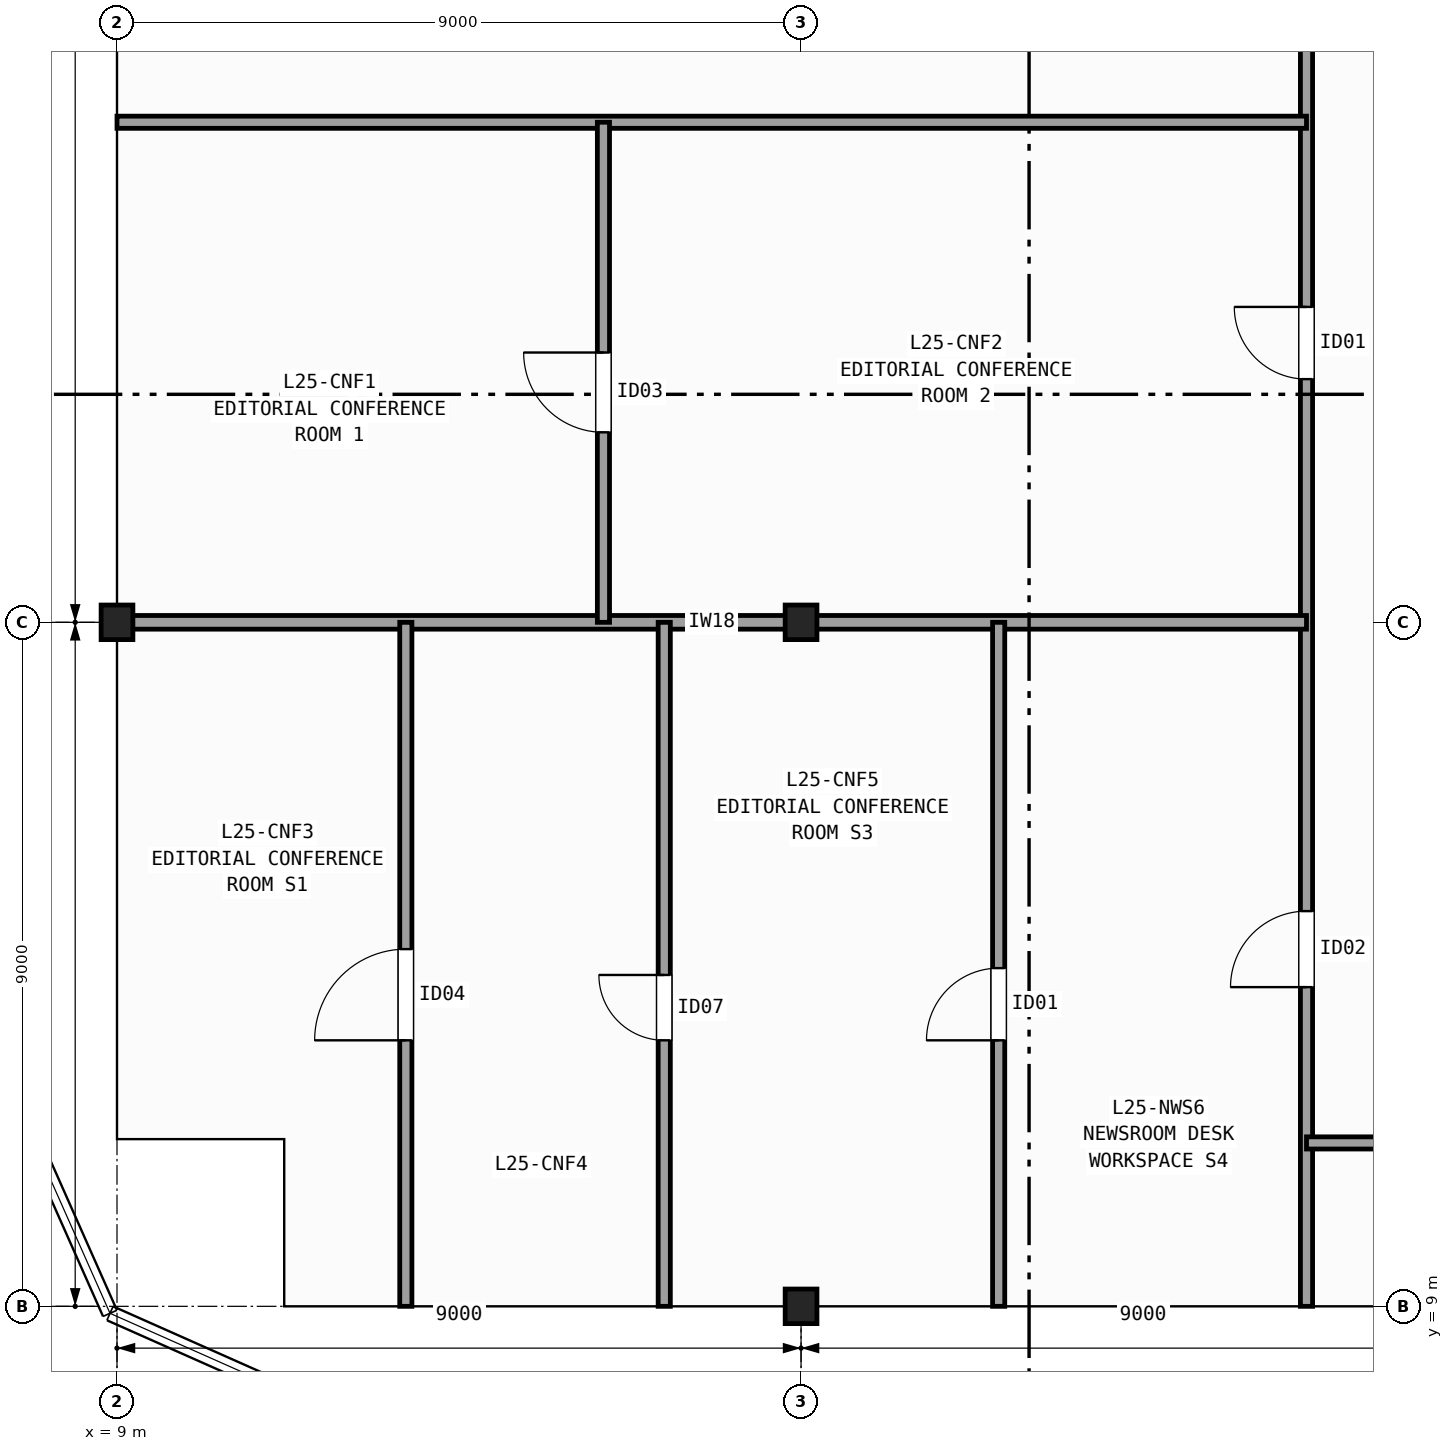
"""IFC4 building model, lengths in metres.
Left out: names, types, materials, properties, quantities, classifications, styles, units other than length and angle.
Written with IfcOpenShell. Run it as: python <this file> out.ifc"""

import sys

from ifc_helpers import new_model, si_unit, direction, frame, frame_2d, origin, origin_2d, place, context, subcontext, project, spatial, rectangle, i_section, extrude, element, fill, save


model = new_model("IFC4")
c1 = context("Model", 3, precision=1e-05, world=origin(), true_north=direction((0.0, 1.0)))
c2 = subcontext(c1, "Body", "Model", "MODEL_VIEW")
j1 = project(units=[si_unit("LENGTHUNIT", "METRE"), si_unit("PLANEANGLEUNIT", "RADIAN")], contexts=[c1])
p1 = place(None, origin())
s1 = spatial("IfcSite", under=j1, at=p1, CompositionType="ELEMENT")
p2 = place(p1, origin())
s2 = spatial("IfcBuilding", under=s1, at=p2, CompositionType="ELEMENT")
p3 = place(p2, frame((0.0, 0.0, 105.0)))
s3 = spatial("IfcBuildingStorey", under=s2, at=p3, CompositionType="ELEMENT", Elevation=105.0)
for number, where, z_axis, x_axis in (
    (1, (9.0, 18.0, 0.0), (0.0, 0.0, 1.0), (1.0, 0.0, 0.0)),
    (2, (18.0, 9.0, 0.0), (0.0, 0.0, 1.0), (1.0, 0.0, 0.0)),
    (3, (18.0, 18.0, 0.0), (0.0, 0.0, 1.0), (1.0, 0.0, 0.0)),
):
    element("IfcColumn", number, at=place(p3, frame(where, z_axis=z_axis, x_axis=x_axis)), inside=s3, PredefinedType="COLUMN", context=c2, shape_type="SweptSolid", body=[
        extrude(i_section(OverallWidth=0.418, OverallDepth=0.455, WebThickness=0.042, FlangeThickness=0.068, FilletRadius=0.015, at=origin_2d()), origin(), (0.0, 0.0, 1.0), 5.0),
    ])
p4 = place(p3, frame((24.65, 9.0, 0.0), z_axis=(0.0, 0.0, 1.0), x_axis=(0.0, 1.0, 0.0)))
e4 = element("IfcWall", 4, at=p4, inside=s3, PredefinedType="PARTITIONING", context=c2, shape_type="SweptSolid", body=[
    extrude(rectangle(XDim=19.2, YDim=0.16, at=frame_2d((9.6, 0.0))), origin(), (0.0, 0.0, 1.0), 3.934),
])
p5 = place(p4, frame((12.2, 0.0, 0.0)))
e5 = element("IfcOpeningElement", 5, at=p5, cuts=e4, PredefinedType="OPENING", context=c2, shape_type="SweptSolid", body=[
    extrude(rectangle(XDim=0.95, YDim=2.1, at=frame_2d((0.475, 1.05))), frame((0.0, 0.09, 0.0), z_axis=(0.0, -1.0, 0.0), x_axis=(1.0, 0.0, 0.0)), (0.0, 0.0, 1.0), 0.18),
])
p6 = place(p4, frame((4.2, 0.0, 0.0)))
e6 = element("IfcOpeningElement", 6, at=p6, cuts=e4, PredefinedType="OPENING", context=c2, shape_type="SweptSolid", body=[
    extrude(rectangle(XDim=1.0, YDim=2.1, at=frame_2d((0.5, 1.05))), frame((0.0, 0.09, 0.0), z_axis=(0.0, -1.0, 0.0), x_axis=(1.0, 0.0, 0.0)), (0.0, 0.0, 1.0), 0.18),
])
p7 = place(p3, frame((9.0, 24.58, 0.0), z_axis=(0.0, 0.0, 1.0), x_axis=(1.0, 0.0, 0.0)))
e7 = element("IfcWall", 7, at=p7, inside=s3, PredefinedType="PARTITIONING", context=c2, shape_type="SweptSolid", body=[
    extrude(rectangle(XDim=15.65, YDim=0.16, at=frame_2d((7.825, 0.0))), origin(), (0.0, 0.0, 1.0), 3.934),
])
p8 = place(p3, frame((9.0, 18.0, 0.0), z_axis=(0.0, 0.0, 1.0), x_axis=(1.0, 0.0, 0.0)))
e8 = element("IfcWall", 8, at=p8, inside=s3, PredefinedType="PARTITIONING", context=c2, shape_type="SweptSolid", body=[
    extrude(rectangle(XDim=15.65, YDim=0.18, at=frame_2d((7.825, 0.0))), origin(), (0.0, 0.0, 1.0), 3.934),
])
p9 = place(p3, frame((15.4, 18.0, 0.0), z_axis=(0.0, 0.0, 1.0), x_axis=(0.0, 1.0, 0.0)))
e9 = element("IfcWall", 9, at=p9, inside=s3, PredefinedType="PARTITIONING", context=c2, shape_type="SweptSolid", body=[
    extrude(rectangle(XDim=6.58, YDim=0.16, at=frame_2d((3.29, 0.0))), origin(), (0.0, 0.0, 1.0), 4.089),
])
p10 = place(p9, frame((2.5, 0.0, 0.0)))
e10 = element("IfcOpeningElement", 10, at=p10, cuts=e9, PredefinedType="OPENING", context=c2, shape_type="SweptSolid", body=[
    extrude(rectangle(XDim=1.05, YDim=2.15, at=frame_2d((0.525, 1.075))), frame((0.0, 0.09, 0.0), z_axis=(0.0, -1.0, 0.0), x_axis=(1.0, 0.0, 0.0)), (0.0, 0.0, 1.0), 0.18),
])
p11 = place(p3, frame((12.8, 9.0, 0.0), z_axis=(0.0, 0.0, 1.0), x_axis=(0.0, 1.0, 0.0)))
e11 = element("IfcWall", 11, at=p11, inside=s3, PredefinedType="PARTITIONING", context=c2, shape_type="SweptSolid", body=[
    extrude(rectangle(XDim=9.0, YDim=0.16, at=frame_2d((4.5, 0.0))), origin(), (0.0, 0.0, 1.0), 4.089),
])
p12 = place(p11, frame((3.5, 0.0, 0.0)))
e12 = element("IfcOpeningElement", 12, at=p12, cuts=e11, PredefinedType="OPENING", context=c2, shape_type="SweptSolid", body=[
    extrude(rectangle(XDim=1.2, YDim=2.15, at=frame_2d((0.6, 1.075))), frame((0.0, 0.09, 0.0), z_axis=(0.0, -1.0, 0.0), x_axis=(1.0, 0.0, 0.0)), (0.0, 0.0, 1.0), 0.18),
])
p13 = place(p3, frame((16.2, 9.0, 0.0), z_axis=(0.0, 0.0, 1.0), x_axis=(0.0, 1.0, 0.0)))
e13 = element("IfcWall", 13, at=p13, inside=s3, PredefinedType="PARTITIONING", context=c2, shape_type="SweptSolid", body=[
    extrude(rectangle(XDim=9.0, YDim=0.16, at=frame_2d((4.5, 0.0))), origin(), (0.0, 0.0, 1.0), 4.089),
])
p14 = place(p13, frame((3.5, 0.0, 0.0)))
e14 = element("IfcOpeningElement", 14, at=p14, cuts=e13, PredefinedType="OPENING", context=c2, shape_type="SweptSolid", body=[
    extrude(rectangle(XDim=0.86, YDim=2.05, at=frame_2d((0.43, 1.025))), frame((0.0, 0.09, 0.0), z_axis=(0.0, -1.0, 0.0), x_axis=(1.0, 0.0, 0.0)), (0.0, 0.0, 1.0), 0.18),
])
p15 = place(p3, frame((20.6, 9.0, 0.0), z_axis=(0.0, 0.0, 1.0), x_axis=(0.0, 1.0, 0.0)))
e15 = element("IfcWall", 15, at=p15, inside=s3, PredefinedType="PARTITIONING", context=c2, shape_type="SweptSolid", body=[
    extrude(rectangle(XDim=9.0, YDim=0.16, at=frame_2d((4.5, 0.0))), origin(), (0.0, 0.0, 1.0), 3.934),
])
p16 = place(p15, frame((3.5, 0.0, 0.0)))
e16 = element("IfcOpeningElement", 16, at=p16, cuts=e15, PredefinedType="OPENING", context=c2, shape_type="SweptSolid", body=[
    extrude(rectangle(XDim=0.95, YDim=2.1, at=frame_2d((0.475, 1.05))), frame((0.0, 0.09, 0.0), z_axis=(0.0, -1.0, 0.0), x_axis=(1.0, 0.0, 0.0)), (0.0, 0.0, 1.0), 0.18),
])
p17 = place(p3, frame((24.65, 11.15, 0.0), z_axis=(0.0, 0.0, 1.0), x_axis=(1.0, 0.0, 0.0)))
e17 = element("IfcWall", 17, at=p17, inside=s3, PredefinedType="PARTITIONING", context=c2, shape_type="SweptSolid", body=[
    extrude(rectangle(XDim=4.75, YDim=0.16, at=frame_2d((2.375, 0.0))), origin(), (0.0, 0.0, 1.0), 4.092),
])
p18 = place(p17, frame((1.2, 0.0, 0.0)))
e18 = element("IfcOpeningElement", 18, at=p18, cuts=e17, PredefinedType="OPENING", context=c2, shape_type="SweptSolid", body=[
    extrude(rectangle(XDim=0.86, YDim=2.05, at=frame_2d((0.43, 1.025))), frame((0.0, 0.09, 0.0), z_axis=(0.0, -1.0, 0.0), x_axis=(1.0, 0.0, 0.0)), (0.0, 0.0, 1.0), 0.18),
])
p19 = place(p5, origin())
e19 = element("IfcDoor", 19, at=p19, inside=s3, OperationType="SINGLE_SWING_RIGHT", PredefinedType="DOOR", context=c2, shape_type="SweptSolid", body=[
    extrude(rectangle(XDim=0.95, YDim=2.1, at=frame_2d((0.475, 1.05))), frame((0.0, 0.025, 0.0), z_axis=(0.0, -1.0, 0.0), x_axis=(1.0, 0.0, 0.0)), (0.0, 0.0, 1.0), 0.05),
])
fill(e5, e19)
p20 = place(p6, origin())
e20 = element("IfcDoor", 20, at=p20, inside=s3, OperationType="SINGLE_SWING_LEFT", PredefinedType="DOOR", context=c2, shape_type="SweptSolid", body=[
    extrude(rectangle(XDim=1.0, YDim=2.1, at=frame_2d((0.5, 1.05))), frame((0.0, 0.025, 0.0), z_axis=(0.0, -1.0, 0.0), x_axis=(1.0, 0.0, 0.0)), (0.0, 0.0, 1.0), 0.05),
])
fill(e6, e20)
p21 = place(p10, origin())
e21 = element("IfcDoor", 21, at=p21, inside=s3, OperationType="SINGLE_SWING_RIGHT", PredefinedType="DOOR", context=c2, shape_type="SweptSolid", body=[
    extrude(rectangle(XDim=1.05, YDim=2.15, at=frame_2d((0.525, 1.075))), frame((0.0, 0.025, 0.0), z_axis=(0.0, -1.0, 0.0), x_axis=(1.0, 0.0, 0.0)), (0.0, 0.0, 1.0), 0.05),
])
fill(e10, e21)
p22 = place(p12, origin())
e22 = element("IfcDoor", 22, at=p22, inside=s3, OperationType="SINGLE_SWING_LEFT", PredefinedType="DOOR", context=c2, shape_type="SweptSolid", body=[
    extrude(rectangle(XDim=1.2, YDim=2.15, at=frame_2d((0.6, 1.075))), frame((0.0, 0.025, 0.0), z_axis=(0.0, -1.0, 0.0), x_axis=(1.0, 0.0, 0.0)), (0.0, 0.0, 1.0), 0.05),
])
fill(e12, e22)
p23 = place(p14, origin())
e23 = element("IfcDoor", 23, at=p23, inside=s3, OperationType="SINGLE_SWING_RIGHT", PredefinedType="DOOR", context=c2, shape_type="SweptSolid", body=[
    extrude(rectangle(XDim=0.86, YDim=2.05, at=frame_2d((0.43, 1.025))), frame((0.0, 0.025, 0.0), z_axis=(0.0, -1.0, 0.0), x_axis=(1.0, 0.0, 0.0)), (0.0, 0.0, 1.0), 0.05),
])
fill(e14, e23)
p24 = place(p16, origin())
e24 = element("IfcDoor", 24, at=p24, inside=s3, OperationType="SINGLE_SWING_LEFT", PredefinedType="DOOR", context=c2, shape_type="SweptSolid", body=[
    extrude(rectangle(XDim=0.95, YDim=2.1, at=frame_2d((0.475, 1.05))), frame((0.0, 0.025, 0.0), z_axis=(0.0, -1.0, 0.0), x_axis=(1.0, 0.0, 0.0)), (0.0, 0.0, 1.0), 0.05),
])
fill(e16, e24)
save(model, sys.argv[1])
